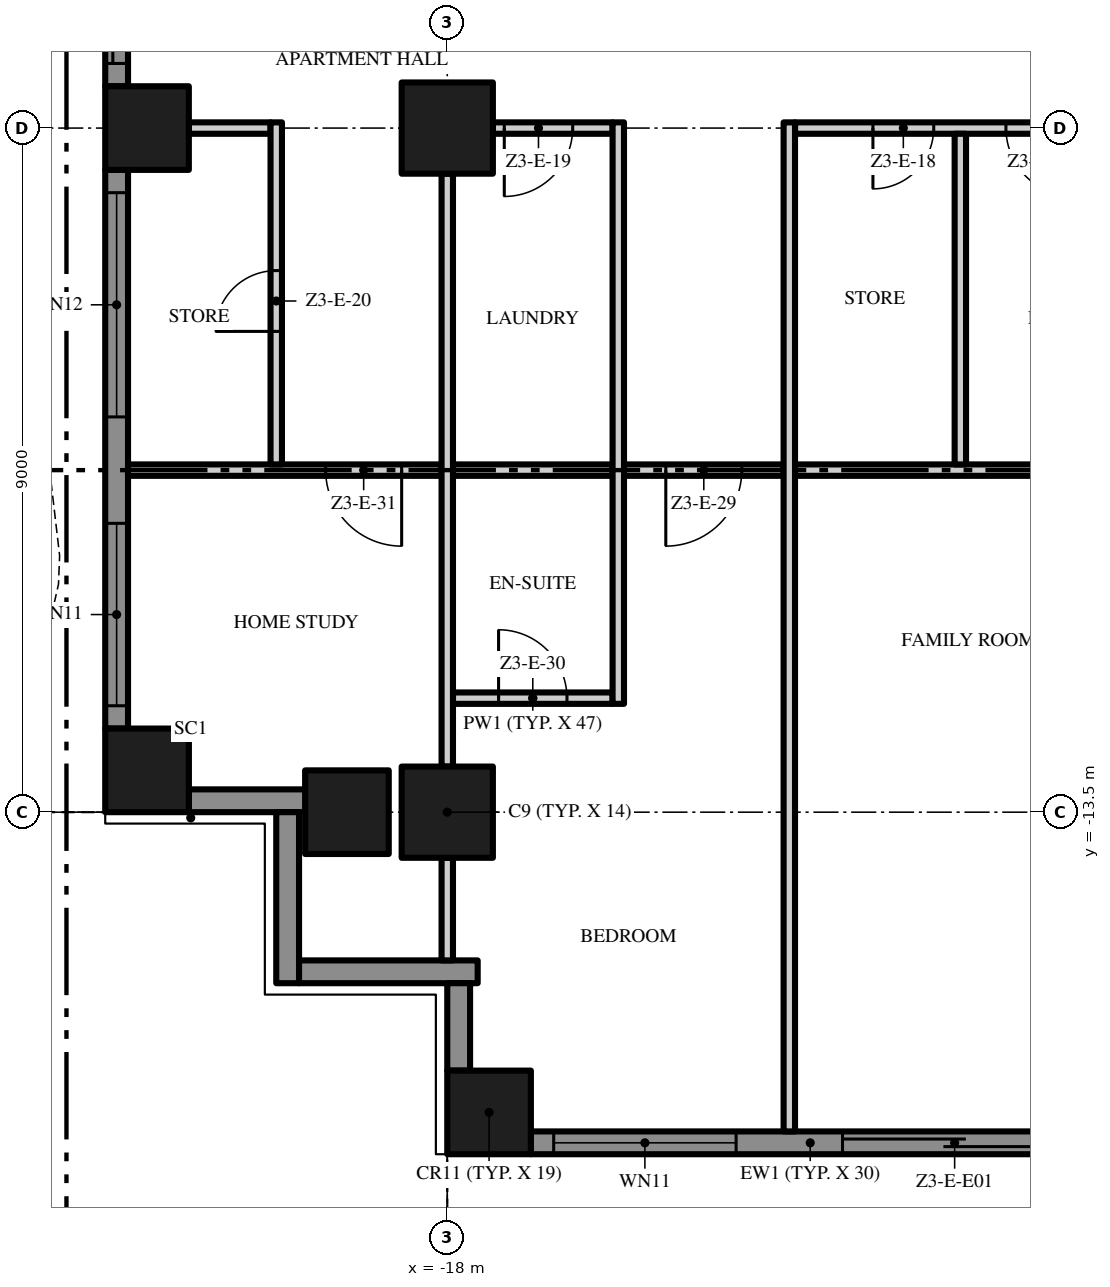
"""IFC4 building model, lengths in metres.
Left out: names, types, materials, properties, quantities, classifications, styles, units other than length and angle.
Written with IfcOpenShell. Run it as: python <this file> out.ifc"""

import sys

from ifc_helpers import new_model, si_unit, direction, frame, frame_2d, origin, origin_2d, place, context, subcontext, project, spatial, polyline, rectangle, outline, extrude, element, fill, save


model = new_model("IFC4")
c1 = context("Model", 3, precision=1e-05, world=origin(), true_north=direction((0.0, 1.0)))
c2 = subcontext(c1, "Body", "Model", "MODEL_VIEW")
j1 = project(units=[si_unit("LENGTHUNIT", "METRE"), si_unit("PLANEANGLEUNIT", "RADIAN")], contexts=[c1])
p1 = place(None, origin())
s1 = spatial("IfcSite", under=j1, at=p1, CompositionType="ELEMENT")
p2 = place(p1, origin())
s2 = spatial("IfcBuilding", under=s1, at=p2, CompositionType="ELEMENT")
p3 = place(p2, frame((0.0, 0.0, 170.6)))
s3 = spatial("IfcBuildingStorey", under=s2, at=p3, CompositionType="ELEMENT", Elevation=170.6)
p4 = place(p3, frame((-18.0, -13.5, 0.0), z_axis=(0.0, 0.0, 1.0), x_axis=(1.0, 0.0, 0.0)))
e1 = element("IfcColumn", 1, at=p4, inside=s3, PredefinedType="COLUMN", context=c2, shape_type="SweptSolid", body=[
    extrude(rectangle(XDim=1.2, YDim=1.2, at=origin_2d()), origin(), (0.0, 0.0, 1.0), 3.5),
])
p5 = place(p3, frame((-17.45, -17.45, 0.0), z_axis=(0.0, 0.0, 1.0), x_axis=(1.0, 0.0, 0.0)))
e2 = element("IfcColumn", 2, at=p5, inside=s3, PredefinedType="COLUMN", context=c2, shape_type="SweptSolid", body=[
    extrude(rectangle(XDim=1.1, YDim=1.1, at=origin_2d()), origin(), (0.0, 0.0, 1.0), 3.5),
])
p6 = place(p3, frame((-18.0, -4.5, 0.0), z_axis=(0.0, 0.0, 1.0), x_axis=(1.0, 0.0, 0.0)))
e3 = element("IfcColumn", 3, at=p6, inside=s3, PredefinedType="COLUMN", context=c2, shape_type="SweptSolid", body=[
    extrude(rectangle(XDim=1.2, YDim=1.2, at=origin_2d()), origin(), (0.0, 0.0, 1.0), 3.5),
])
for number, where, z_axis, x_axis in (
    (4, (-21.95, -12.95, 0.0), (0.0, 0.0, 1.0), (1.0, 0.0, 0.0)),
    (5, (-19.32, -13.5, 0.0), (0.0, 0.0, 1.0), (1.0, 0.0, 0.0)),
    (6, (-21.95, -4.5, 0.0), (0.0, 0.0, 1.0), (1.0, 0.0, 0.0)),
):
    element("IfcColumn", number, at=place(p3, frame(where, z_axis=z_axis, x_axis=x_axis)), inside=s3, PredefinedType="COLUMN", context=c2, shape_type="SweptSolid", body=[
        extrude(rectangle(XDim=1.1, YDim=1.1, at=origin_2d()), origin(), (0.0, 0.0, 1.0), 3.5),
    ])
p7 = place(p3, frame((-9.55, -17.85, 0.0), z_axis=(0.0, 0.0, 1.0), x_axis=(-1.0, 0.0, 0.0)))
e7 = element("IfcWall", 7, at=p7, inside=s3, PredefinedType="SOLIDWALL", context=c2, shape_type="SweptSolid", body=[
    extrude(rectangle(XDim=7.35, YDim=0.3, at=frame_2d((3.675, 0.0))), origin(), (0.0, 0.0, 1.0), 3.5),
])
p8 = place(p7, frame((4.65, 0.0, 0.45)))
e8 = element("IfcOpeningElement", 8, at=p8, cuts=e7, PredefinedType="OPENING", context=c2, shape_type="SweptSolid", body=[
    extrude(rectangle(XDim=2.4, YDim=2.65, at=frame_2d((1.2, 1.325))), frame((0.0, 0.16, 0.0), z_axis=(0.0, -1.0, 0.0), x_axis=(1.0, 0.0, 0.0)), (0.0, 0.0, 1.0), 0.32),
])
p9 = place(p7, frame((0.3, 0.0, 0.0)))
e9 = element("IfcOpeningElement", 9, at=p9, cuts=e7, PredefinedType="OPENING", context=c2, shape_type="SweptSolid", body=[
    extrude(rectangle(XDim=2.95, YDim=2.4, at=frame_2d((1.475, 1.2))), frame((0.0, 0.16, 0.0), z_axis=(0.0, -1.0, 0.0), x_axis=(1.0, 0.0, 0.0)), (0.0, 0.0, 1.0), 0.32),
])
p10 = place(p3, frame((-22.35, -3.95, 0.0), z_axis=(0.0, 0.0, 1.0), x_axis=(0.0, 1.0, 0.0)))
e10 = element("IfcWall", 10, at=p10, inside=s3, PredefinedType="SOLIDWALL", context=c2, shape_type="SweptSolid", body=[
    extrude(rectangle(XDim=7.9, YDim=0.3, at=frame_2d((3.95, 0.0))), origin(), (0.0, 0.0, 1.0), 3.5),
])
p11 = place(p10, frame((4.65, 0.0, 0.45)))
e11 = element("IfcOpeningElement", 11, at=p11, cuts=e10, PredefinedType="OPENING", context=c2, shape_type="SweptSolid", body=[
    extrude(rectangle(XDim=2.95, YDim=2.65, at=frame_2d((1.475, 1.325))), frame((0.0, 0.16, 0.0), z_axis=(0.0, -1.0, 0.0), x_axis=(1.0, 0.0, 0.0)), (0.0, 0.0, 1.0), 0.32),
])
p12 = place(p10, frame((0.3, 0.0, 0.0)))
e12 = element("IfcOpeningElement", 12, at=p12, cuts=e10, PredefinedType="OPENING", context=c2, shape_type="SweptSolid", body=[
    extrude(rectangle(XDim=2.95, YDim=2.4, at=frame_2d((1.475, 1.2))), frame((0.0, 0.16, 0.0), z_axis=(0.0, -1.0, 0.0), x_axis=(1.0, 0.0, 0.0)), (0.0, 0.0, 1.0), 0.32),
])
p13 = place(p3, frame((-22.35, -12.4, 0.0), z_axis=(0.0, 0.0, 1.0), x_axis=(0.0, 1.0, 0.0)))
e13 = element("IfcWall", 13, at=p13, inside=s3, PredefinedType="SOLIDWALL", context=c2, shape_type="SweptSolid", body=[
    extrude(rectangle(XDim=7.35, YDim=0.3, at=frame_2d((3.675, 0.0))), origin(), (0.0, 0.0, 1.0), 3.5),
])
p14 = place(p13, frame((4.1, 0.0, 0.45)))
e14 = element("IfcOpeningElement", 14, at=p14, cuts=e13, PredefinedType="OPENING", context=c2, shape_type="SweptSolid", body=[
    extrude(rectangle(XDim=2.95, YDim=2.65, at=frame_2d((1.475, 1.325))), frame((0.0, 0.16, 0.0), z_axis=(0.0, -1.0, 0.0), x_axis=(1.0, 0.0, 0.0)), (0.0, 0.0, 1.0), 0.32),
])
p15 = place(p13, frame((0.3, 0.0, 0.45)))
e15 = element("IfcOpeningElement", 15, at=p15, cuts=e13, PredefinedType="OPENING", context=c2, shape_type="SweptSolid", body=[
    extrude(rectangle(XDim=2.4, YDim=2.65, at=frame_2d((1.2, 1.325))), frame((0.0, 0.16, 0.0), z_axis=(0.0, -1.0, 0.0), x_axis=(1.0, 0.0, 0.0)), (0.0, 0.0, 1.0), 0.32),
])
p16 = place(p3, frame((-19.85, -13.35, 0.0), z_axis=(0.0, 0.0, 1.0), x_axis=(-1.0, 0.0, 0.0)))
e16 = element("IfcWall", 16, at=p16, inside=s3, PredefinedType="SOLIDWALL", context=c2, shape_type="SweptSolid", body=[
    extrude(rectangle(XDim=1.55, YDim=0.3, at=frame_2d((0.775, 0.0))), origin(), (0.0, 0.0, 1.0), 3.5),
])
p17 = place(p3, frame((-20.1, -15.75, 0.0), z_axis=(0.0, 0.0, 1.0), x_axis=(0.0, 1.0, 0.0)))
e17 = element("IfcWall", 17, at=p17, inside=s3, PredefinedType="SOLIDWALL", context=c2, shape_type="SweptSolid", body=[
    extrude(rectangle(XDim=2.25, YDim=0.3, at=frame_2d((1.125, 0.0))), origin(), (0.0, 0.0, 1.0), 3.5),
])
p18 = place(p3, frame((-17.6, -15.6, 0.0), z_axis=(0.0, 0.0, 1.0), x_axis=(-1.0, 0.0, 0.0)))
e18 = element("IfcWall", 18, at=p18, inside=s3, PredefinedType="SOLIDWALL", context=c2, shape_type="SweptSolid", body=[
    extrude(rectangle(XDim=2.35, YDim=0.3, at=frame_2d((1.175, 0.0))), origin(), (0.0, 0.0, 1.0), 3.5),
])
p19 = place(p3, frame((-17.85, -16.9, 0.0), z_axis=(0.0, 0.0, 1.0), x_axis=(0.0, 1.0, 0.0)))
e19 = element("IfcWall", 19, at=p19, inside=s3, PredefinedType="SOLIDWALL", context=c2, shape_type="SweptSolid", body=[
    extrude(rectangle(XDim=1.15, YDim=0.3, at=frame_2d((0.575, 0.0))), origin(), (0.0, 0.0, 1.0), 3.5),
])
p20 = place(p3, origin())
e20 = element("IfcWall", 20, at=p20, inside=s3, PredefinedType="USERDEFINED", context=c2, shape_type="SweptSolid", body=[
    extrude(outline(polyline([(-18.0, -18.951), (-16.5, -19.612), (-15.0, -20.345), (-13.5, -20.869), (-12.375, -21.0), (-12.0, -20.985), (-10.5, -20.649), (-9.0, -19.988), (-7.5, -19.255), (-6.0, -18.731), (-4.875, -18.6), (-4.5, -18.615), (-3.0, -18.951), (-1.5, -19.612), (0.0, -20.345), (1.5, -20.869), (2.625, -21.0), (3.0, -20.985), (4.5, -20.649), (6.0, -19.988), (7.5, -19.255), (9.0, -18.731), (10.125, -18.6), (10.5, -18.615), (12.0, -18.951), (13.5, -19.612), (15.0, -20.345), (16.5, -20.869), (17.625, -21.0), (18.0, -20.985), (17.99, -20.735), (17.635, -20.749), (16.556, -20.624), (15.096, -20.114), (13.605, -19.385), (12.079, -18.713), (10.533, -18.366), (10.115, -18.349), (8.944, -18.486), (7.404, -19.024), (5.895, -19.761), (4.421, -20.41), (2.967, -20.736), (2.635, -20.749), (1.556, -20.624), (0.096, -20.114), (-1.395, -19.385), (-2.921, -18.713), (-4.467, -18.366), (-4.885, -18.349), (-6.056, -18.486), (-7.596, -19.024), (-9.105, -19.761), (-10.579, -20.41), (-12.033, -20.736), (-12.365, -20.749), (-13.444, -20.624), (-14.904, -20.114), (-16.395, -19.385), (-17.899, -18.723), (-18.0, -18.951)])), origin(), (0.0, 0.0, 1.0), 0.9),
])
p21 = place(p3, origin())
e21 = element("IfcWall", 21, at=p21, inside=s3, PredefinedType="USERDEFINED", context=c2, shape_type="SweptSolid", body=[
    extrude(outline(polyline([(-23.451, 18.0), (-24.112, 16.5), (-24.845, 15.0), (-25.369, 13.5), (-25.5, 12.375), (-25.485, 12.0), (-25.149, 10.5), (-24.488, 9.0), (-23.755, 7.5), (-23.231, 6.0), (-23.1, 4.875), (-23.115, 4.5), (-23.451, 3.0), (-24.112, 1.5), (-24.845, 0.0), (-25.369, -1.5), (-25.5, -2.625), (-25.485, -3.0), (-25.149, -4.5), (-24.488, -6.0), (-23.755, -7.5), (-23.231, -9.0), (-23.1, -10.125), (-23.115, -10.5), (-23.451, -12.0), (-24.112, -13.5), (-23.883, -13.601), (-23.213, -12.079), (-22.866, -10.533), (-22.849, -10.115), (-22.986, -8.944), (-23.524, -7.404), (-24.261, -5.895), (-24.91, -4.421), (-25.236, -2.967), (-25.249, -2.635), (-25.124, -1.556), (-24.614, -0.096), (-23.885, 1.395), (-23.213, 2.921), (-22.866, 4.467), (-22.849, 4.885), (-22.986, 6.056), (-23.524, 7.596), (-24.261, 9.105), (-24.91, 10.579), (-25.236, 12.033), (-25.249, 12.365), (-25.124, 13.444), (-24.614, 14.904), (-23.885, 16.395), (-23.223, 17.899), (-23.451, 18.0)])), origin(), (0.0, 0.0, 1.0), 0.9),
])
p22 = place(p3, frame((-17.925, -12.0, 0.0), z_axis=(0.0, 0.0, 1.0), x_axis=(1.0, 0.0, 0.0)))
e22 = element("IfcWall", 22, at=p22, inside=s3, PredefinedType="PARTITIONING", context=c2, shape_type="SweptSolid", body=[
    extrude(rectangle(XDim=2.1, YDim=0.15, at=frame_2d((1.05, 0.0))), origin(), (0.0, 0.0, 1.0), 3.5),
])
p23 = place(p22, frame((0.6, 0.0, 0.0)))
e23 = element("IfcOpeningElement", 23, at=p23, cuts=e22, PredefinedType="OPENING", context=c2, shape_type="SweptSolid", body=[
    extrude(rectangle(XDim=0.9, YDim=2.1, at=frame_2d((0.45, 1.05))), frame((0.0, 0.085, 0.0), z_axis=(0.0, -1.0, 0.0), x_axis=(1.0, 0.0, 0.0)), (0.0, 0.0, 1.0), 0.17),
])
p24 = place(p3, frame((-18.075, -9.0, 0.0), z_axis=(0.0, 0.0, 1.0), x_axis=(-1.0, 0.0, 0.0)))
e24 = element("IfcWall", 24, at=p24, inside=s3, PredefinedType="PARTITIONING", context=c2, shape_type="SweptSolid", body=[
    extrude(rectangle(XDim=4.125, YDim=0.15, at=frame_2d((2.062, 0.0))), origin(), (0.0, 0.0, 1.0), 3.5),
])
p25 = place(p24, frame((0.525, 0.0, 0.0)))
e25 = element("IfcOpeningElement", 25, at=p25, cuts=e24, PredefinedType="OPENING", context=c2, shape_type="SweptSolid", body=[
    extrude(rectangle(XDim=1.0, YDim=2.4, at=frame_2d((0.5, 1.2))), frame((0.0, 0.085, 0.0), z_axis=(0.0, -1.0, 0.0), x_axis=(1.0, 0.0, 0.0)), (0.0, 0.0, 1.0), 0.17),
])
p26 = place(p3, frame((-17.925, -9.0, 0.0), z_axis=(0.0, 0.0, 1.0), x_axis=(1.0, 0.0, 0.0)))
e26 = element("IfcWall", 26, at=p26, inside=s3, PredefinedType="PARTITIONING", context=c2, shape_type="SweptSolid", body=[
    extrude(rectangle(XDim=2.1, YDim=0.15, at=frame_2d((1.05, 0.0))), origin(), (0.0, 0.0, 1.0), 3.5),
])
p27 = place(p3, frame((-13.575, -9.0, 0.0), z_axis=(0.0, 0.0, 1.0), x_axis=(-1.0, 0.0, 0.0)))
e27 = element("IfcWall", 27, at=p27, inside=s3, PredefinedType="PARTITIONING", context=c2, shape_type="SweptSolid", body=[
    extrude(rectangle(XDim=2.1, YDim=0.15, at=frame_2d((1.05, 0.0))), origin(), (0.0, 0.0, 1.0), 3.5),
])
p28 = place(p27, frame((0.55, 0.0, 0.0)))
e28 = element("IfcOpeningElement", 28, at=p28, cuts=e27, PredefinedType="OPENING", context=c2, shape_type="SweptSolid", body=[
    extrude(rectangle(XDim=1.0, YDim=2.4, at=frame_2d((0.5, 1.2))), frame((0.0, 0.085, 0.0), z_axis=(0.0, -1.0, 0.0), x_axis=(1.0, 0.0, 0.0)), (0.0, 0.0, 1.0), 0.17),
])
p29 = place(p3, frame((-4.575, -9.0, 0.0), z_axis=(0.0, 0.0, 1.0), x_axis=(-1.0, 0.0, 0.0)))
e29 = element("IfcWall", 29, at=p29, inside=s3, PredefinedType="PARTITIONING", context=c2, shape_type="SweptSolid", body=[
    extrude(rectangle(XDim=8.85, YDim=0.15, at=frame_2d((4.425, 0.0))), origin(), (0.0, 0.0, 1.0), 3.5),
])
p30 = place(p29, frame((1.075, 0.0, 0.0)))
e30 = element("IfcOpeningElement", 30, at=p30, cuts=e29, PredefinedType="OPENING", context=c2, shape_type="SweptSolid", body=[
    extrude(rectangle(XDim=1.5, YDim=2.4, at=frame_2d((0.75, 1.2))), frame((0.0, 0.085, 0.0), z_axis=(0.0, -1.0, 0.0), x_axis=(1.0, 0.0, 0.0)), (0.0, 0.0, 1.0), 0.17),
])
p31 = place(p3, frame((-21.4, -4.5, 0.0), z_axis=(0.0, 0.0, 1.0), x_axis=(1.0, 0.0, 0.0)))
e31 = element("IfcWall", 31, at=p31, inside=s3, PredefinedType="PARTITIONING", context=c2, shape_type="SweptSolid", body=[
    extrude(rectangle(XDim=1.075, YDim=0.15, at=frame_2d((0.537, 0.0))), origin(), (0.0, 0.0, 1.0), 3.5),
])
p32 = place(p3, frame((-15.825, -4.5, 0.0), z_axis=(0.0, 0.0, 1.0), x_axis=(-1.0, 0.0, 0.0)))
e32 = element("IfcWall", 32, at=p32, inside=s3, PredefinedType="PARTITIONING", context=c2, shape_type="SweptSolid", body=[
    extrude(rectangle(XDim=1.575, YDim=0.15, at=frame_2d((0.787, 0.0))), origin(), (0.0, 0.0, 1.0), 3.5),
])
p33 = place(p32, frame((0.525, 0.0, 0.0)))
e33 = element("IfcOpeningElement", 33, at=p33, cuts=e32, PredefinedType="OPENING", context=c2, shape_type="SweptSolid", body=[
    extrude(rectangle(XDim=0.9, YDim=2.1, at=frame_2d((0.45, 1.05))), frame((0.0, 0.085, 0.0), z_axis=(0.0, -1.0, 0.0), x_axis=(1.0, 0.0, 0.0)), (0.0, 0.0, 1.0), 0.17),
])
p34 = place(p3, frame((-9.6, -4.5, 0.0), z_axis=(0.0, 0.0, 1.0), x_axis=(-1.0, 0.0, 0.0)))
e34 = element("IfcWall", 34, at=p34, inside=s3, PredefinedType="PARTITIONING", context=c2, shape_type="SweptSolid", body=[
    extrude(rectangle(XDim=3.825, YDim=0.15, at=frame_2d((1.913, 0.0))), origin(), (0.0, 0.0, 1.0), 3.5),
])
p35 = place(p34, frame((0.15, 0.0, 0.0)))
e35 = element("IfcOpeningElement", 35, at=p35, cuts=e34, PredefinedType="OPENING", context=c2, shape_type="SweptSolid", body=[
    extrude(rectangle(XDim=0.9, YDim=2.1, at=frame_2d((0.45, 1.05))), frame((0.0, 0.085, 0.0), z_axis=(0.0, -1.0, 0.0), x_axis=(1.0, 0.0, 0.0)), (0.0, 0.0, 1.0), 0.17),
])
p36 = place(p34, frame((2.0, 0.0, 0.0)))
e36 = element("IfcOpeningElement", 36, at=p36, cuts=e34, PredefinedType="OPENING", context=c2, shape_type="SweptSolid", body=[
    extrude(rectangle(XDim=0.8, YDim=2.0, at=frame_2d((0.4, 1.0))), frame((0.0, 0.085, 0.0), z_axis=(0.0, -1.0, 0.0), x_axis=(1.0, 0.0, 0.0)), (0.0, 0.0, 1.0), 0.17),
])
p37 = place(p3, frame((-20.25, -8.925, 0.0), z_axis=(0.0, 0.0, 1.0), x_axis=(0.0, 1.0, 0.0)))
e37 = element("IfcWall", 37, at=p37, inside=s3, PredefinedType="PARTITIONING", context=c2, shape_type="SweptSolid", body=[
    extrude(rectangle(XDim=4.5, YDim=0.15, at=frame_2d((2.25, 0.0))), origin(), (0.0, 0.0, 1.0), 3.5),
])
p38 = place(p37, frame((1.75, 0.0, 0.0)))
e38 = element("IfcOpeningElement", 38, at=p38, cuts=e37, PredefinedType="OPENING", context=c2, shape_type="SweptSolid", body=[
    extrude(rectangle(XDim=0.8, YDim=2.0, at=frame_2d((0.4, 1.0))), frame((0.0, 0.085, 0.0), z_axis=(0.0, -1.0, 0.0), x_axis=(1.0, 0.0, 0.0)), (0.0, 0.0, 1.0), 0.17),
])
p39 = place(p3, frame((-18.0, -15.45, 0.0), z_axis=(0.0, 0.0, 1.0), x_axis=(0.0, 1.0, 0.0)))
e39 = element("IfcWall", 39, at=p39, inside=s3, PredefinedType="PARTITIONING", context=c2, shape_type="SweptSolid", body=[
    extrude(rectangle(XDim=1.35, YDim=0.15, at=frame_2d((0.675, 0.0))), origin(), (0.0, 0.0, 1.0), 3.5),
])
p40 = place(p3, frame((-18.0, -12.9, 0.0), z_axis=(0.0, 0.0, 1.0), x_axis=(0.0, 1.0, 0.0)))
e40 = element("IfcWall", 40, at=p40, inside=s3, PredefinedType="PARTITIONING", context=c2, shape_type="SweptSolid", body=[
    extrude(rectangle(XDim=7.8, YDim=0.15, at=frame_2d((3.9, 0.0))), origin(), (0.0, 0.0, 1.0), 3.5),
])
p41 = place(p3, frame((-15.75, -12.075, 0.0), z_axis=(0.0, 0.0, 1.0), x_axis=(0.0, 1.0, 0.0)))
e41 = element("IfcWall", 41, at=p41, inside=s3, PredefinedType="PARTITIONING", context=c2, shape_type="SweptSolid", body=[
    extrude(rectangle(XDim=7.65, YDim=0.15, at=frame_2d((3.825, 0.0))), origin(), (0.0, 0.0, 1.0), 3.5),
])
p42 = place(p3, frame((-13.5, -17.7, 0.0), z_axis=(0.0, 0.0, 1.0), x_axis=(0.0, 1.0, 0.0)))
e42 = element("IfcWall", 42, at=p42, inside=s3, PredefinedType="PARTITIONING", context=c2, shape_type="SweptSolid", body=[
    extrude(rectangle(XDim=13.275, YDim=0.15, at=frame_2d((6.638, 0.0))), origin(), (0.0, 0.0, 1.0), 3.5),
])
p43 = place(p3, frame((-11.25, -8.925, 0.0), z_axis=(0.0, 0.0, 1.0), x_axis=(0.0, 1.0, 0.0)))
e43 = element("IfcWall", 43, at=p43, inside=s3, PredefinedType="PARTITIONING", context=c2, shape_type="SweptSolid", body=[
    extrude(rectangle(XDim=4.35, YDim=0.15, at=frame_2d((2.175, 0.0))), origin(), (0.0, 0.0, 1.0), 3.5),
])
p44 = place(p8, origin())
e44 = element("IfcWindow", 44, at=p44, inside=s3, PartitioningType="SINGLE_PANEL", PredefinedType="WINDOW", context=c2, shape_type="SweptSolid", body=[
    extrude(rectangle(XDim=2.4, YDim=2.65, at=frame_2d((1.2, 1.325))), frame((0.0, 0.03, 0.0), z_axis=(0.0, -1.0, 0.0), x_axis=(1.0, 0.0, 0.0)), (0.0, 0.0, 1.0), 0.06),
])
fill(e8, e44)
p45 = place(p9, origin())
e45 = element("IfcDoor", 45, at=p45, inside=s3, OperationType="SINGLE_SWING_LEFT", PredefinedType="DOOR", context=c2, shape_type="SweptSolid", body=[
    extrude(rectangle(XDim=2.95, YDim=2.4, at=frame_2d((1.475, 1.2))), frame((0.0, 0.025, 0.0), z_axis=(0.0, -1.0, 0.0), x_axis=(1.0, 0.0, 0.0)), (0.0, 0.0, 1.0), 0.05),
])
fill(e9, e45)
p46 = place(p12, origin())
e46 = element("IfcDoor", 46, at=p46, inside=s3, OperationType="SINGLE_SWING_LEFT", PredefinedType="DOOR", context=c2, shape_type="SweptSolid", body=[
    extrude(rectangle(XDim=2.95, YDim=2.4, at=frame_2d((1.475, 1.2))), frame((0.0, 0.025, 0.0), z_axis=(0.0, -1.0, 0.0), x_axis=(1.0, 0.0, 0.0)), (0.0, 0.0, 1.0), 0.05),
])
fill(e12, e46)
p47 = place(p14, origin())
e47 = element("IfcWindow", 47, at=p47, inside=s3, PartitioningType="SINGLE_PANEL", PredefinedType="WINDOW", context=c2, shape_type="SweptSolid", body=[
    extrude(rectangle(XDim=2.95, YDim=2.65, at=frame_2d((1.475, 1.325))), frame((0.0, 0.03, 0.0), z_axis=(0.0, -1.0, 0.0), x_axis=(1.0, 0.0, 0.0)), (0.0, 0.0, 1.0), 0.06),
])
fill(e14, e47)
p48 = place(p15, origin())
e48 = element("IfcWindow", 48, at=p48, inside=s3, PartitioningType="SINGLE_PANEL", PredefinedType="WINDOW", context=c2, shape_type="SweptSolid", body=[
    extrude(rectangle(XDim=2.4, YDim=2.65, at=frame_2d((1.2, 1.325))), frame((0.0, 0.03, 0.0), z_axis=(0.0, -1.0, 0.0), x_axis=(1.0, 0.0, 0.0)), (0.0, 0.0, 1.0), 0.06),
])
fill(e15, e48)
p49 = place(p35, origin())
e49 = element("IfcDoor", 49, at=p49, inside=s3, OperationType="SINGLE_SWING_LEFT", PredefinedType="DOOR", context=c2, shape_type="SweptSolid", body=[
    extrude(rectangle(XDim=0.9, YDim=2.1, at=frame_2d((0.45, 1.05))), frame((0.0, 0.025, 0.0), z_axis=(0.0, -1.0, 0.0), x_axis=(1.0, 0.0, 0.0)), (0.0, 0.0, 1.0), 0.05),
])
fill(e35, e49)
p50 = place(p36, origin())
e50 = element("IfcDoor", 50, at=p50, inside=s3, OperationType="SINGLE_SWING_RIGHT", PredefinedType="DOOR", context=c2, shape_type="SweptSolid", body=[
    extrude(rectangle(XDim=0.8, YDim=2.0, at=frame_2d((0.4, 1.0))), frame((0.0, 0.025, 0.0), z_axis=(0.0, -1.0, 0.0), x_axis=(1.0, 0.0, 0.0)), (0.0, 0.0, 1.0), 0.05),
])
fill(e36, e50)
p51 = place(p33, origin())
e51 = element("IfcDoor", 51, at=p51, inside=s3, OperationType="SINGLE_SWING_RIGHT", PredefinedType="DOOR", context=c2, shape_type="SweptSolid", body=[
    extrude(rectangle(XDim=0.9, YDim=2.1, at=frame_2d((0.45, 1.05))), frame((0.0, 0.025, 0.0), z_axis=(0.0, -1.0, 0.0), x_axis=(1.0, 0.0, 0.0)), (0.0, 0.0, 1.0), 0.05),
])
fill(e33, e51)
p52 = place(p38, origin())
e52 = element("IfcDoor", 52, at=p52, inside=s3, OperationType="SINGLE_SWING_LEFT", PredefinedType="DOOR", context=c2, shape_type="SweptSolid", body=[
    extrude(rectangle(XDim=0.8, YDim=2.0, at=frame_2d((0.4, 1.0))), frame((0.0, 0.025, 0.0), z_axis=(0.0, -1.0, 0.0), x_axis=(1.0, 0.0, 0.0)), (0.0, 0.0, 1.0), 0.05),
])
fill(e38, e52)
p53 = place(p28, origin())
e53 = element("IfcDoor", 53, at=p53, inside=s3, OperationType="SINGLE_SWING_RIGHT", PredefinedType="DOOR", context=c2, shape_type="SweptSolid", body=[
    extrude(rectangle(XDim=1.0, YDim=2.4, at=frame_2d((0.5, 1.2))), frame((0.0, 0.025, 0.0), z_axis=(0.0, -1.0, 0.0), x_axis=(1.0, 0.0, 0.0)), (0.0, 0.0, 1.0), 0.05),
])
fill(e28, e53)
p54 = place(p23, origin())
e54 = element("IfcDoor", 54, at=p54, inside=s3, OperationType="SINGLE_SWING_LEFT", PredefinedType="DOOR", context=c2, shape_type="SweptSolid", body=[
    extrude(rectangle(XDim=0.9, YDim=2.1, at=frame_2d((0.45, 1.05))), frame((0.0, 0.025, 0.0), z_axis=(0.0, -1.0, 0.0), x_axis=(1.0, 0.0, 0.0)), (0.0, 0.0, 1.0), 0.05),
])
fill(e23, e54)
p55 = place(p25, origin())
e55 = element("IfcDoor", 55, at=p55, inside=s3, OperationType="SINGLE_SWING_LEFT", PredefinedType="DOOR", context=c2, shape_type="SweptSolid", body=[
    extrude(rectangle(XDim=1.0, YDim=2.4, at=frame_2d((0.5, 1.2))), frame((0.0, 0.025, 0.0), z_axis=(0.0, -1.0, 0.0), x_axis=(1.0, 0.0, 0.0)), (0.0, 0.0, 1.0), 0.05),
])
fill(e25, e55)
save(model, sys.argv[1])
